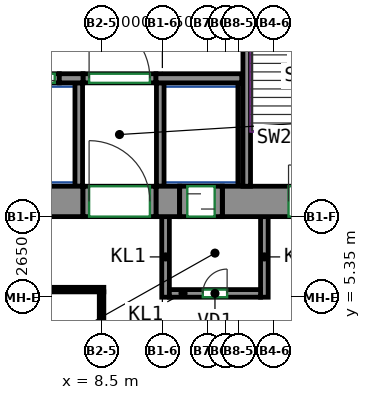
"""IFC4 building model, lengths in metres.
Left out: names, types, materials, properties, quantities, classifications, styles, units other than length and angle.
Written with IfcOpenShell. Run it as: python <this file> out.ifc"""

import sys

from ifc_helpers import new_model, si_unit, direction, frame, frame_2d, origin, place, context, subcontext, project, spatial, rectangle, extrude, source, transform, mapped, element, fill, save


model = new_model("IFC4")
c1 = context("Model", 3, precision=1e-05, world=origin(), true_north=direction((0.0, 1.0)))
c2 = subcontext(c1, "Body", "Model", "MODEL_VIEW")
j1 = project(units=[si_unit("LENGTHUNIT", "METRE"), si_unit("PLANEANGLEUNIT", "RADIAN")], contexts=[c1])
p1 = place(None, origin())
s1 = spatial("IfcSite", under=j1, at=p1, CompositionType="ELEMENT")
p2 = place(p1, origin())
s2 = spatial("IfcBuilding", under=s1, at=p2, CompositionType="ELEMENT")
p3 = place(p2, frame((0.0, 0.0, 22.5)))
s3 = spatial("IfcBuildingStorey", under=s2, at=p3, CompositionType="ELEMENT", Elevation=22.5)
m1 = source(origin(), c2, "Body", "SweptSolid", [
    extrude(rectangle(XDim=14.18, YDim=1.0, at=frame_2d((7.09, 0.0))), origin(), (0.0, 0.0, 1.0), 4.22),
])
p4 = place(p3, frame((-6.29, 8.5, 0.0), z_axis=(0.0, 0.0, 1.0), x_axis=(1.0, 0.0, 0.0)))
e1 = element("IfcWall", 1, at=p4, inside=s3, PredefinedType="SHEAR", context=c2, shape_type="MappedRepresentation", body=[
    mapped(m1, transform((0.0, 0.0, 0.0))),
])
m2 = source(origin(), c2, "Body", "SweptSolid", [
    extrude(rectangle(XDim=0.78, YDim=1.0, at=frame_2d((0.39, 0.0))), origin(), (0.0, 0.0, 1.0), 4.22),
])
p5 = place(p3, frame((10.29, 8.5, 0.0), z_axis=(0.0, 0.0, 1.0), x_axis=(1.0, 0.0, 0.0)))
e2 = element("IfcWall", 2, at=p5, inside=s3, PredefinedType="SHEAR", context=c2, shape_type="MappedRepresentation", body=[
    mapped(m2, transform((0.0, 0.0, 0.0))),
])
m3 = source(origin(), c2, "Body", "SweptSolid", [
    extrude(rectangle(XDim=5.63, YDim=1.0, at=frame_2d((2.815, 0.0))), origin(), (0.0, 0.0, 1.0), 4.22),
])
p6 = place(p3, frame((12.47, 8.5, 0.0), z_axis=(0.0, 0.0, 1.0), x_axis=(1.0, 0.0, 0.0)))
e3 = element("IfcWall", 3, at=p6, inside=s3, PredefinedType="SHEAR", context=c2, shape_type="MappedRepresentation", body=[
    mapped(m3, transform((0.0, 0.0, 0.0))),
])
p7 = place(p6, frame((2.18, 0.0, 0.0)))
e4 = element("IfcOpeningElement", 4, at=p7, cuts=e3, PredefinedType="OPENING", context=c2, shape_type="SweptSolid", body=[
    extrude(rectangle(XDim=1.2, YDim=2.1, at=frame_2d((0.6, 1.05))), frame((0.0, 0.51, 0.0), z_axis=(0.0, -1.0, 0.0), x_axis=(1.0, 0.0, 0.0)), (0.0, 0.0, 1.0), 1.02),
])
m4 = source(origin(), c2, "Body", "SweptSolid", [
    extrude(rectangle(XDim=7.75, YDim=0.25, at=frame_2d((3.875, 0.0))), origin(), (0.0, 0.0, 1.0), 4.22),
])
p8 = place(p3, frame((13.275, 9.0, 0.0), z_axis=(0.0, 0.0, 1.0), x_axis=(0.0, 1.0, 0.0)))
e5 = element("IfcWall", 5, at=p8, inside=s3, PredefinedType="SHEAR", context=c2, shape_type="MappedRepresentation", body=[
    mapped(m4, transform((0.0, 0.0, 0.0))),
])
m5 = source(origin(), c2, "Body", "SweptSolid", [
    extrude(rectangle(XDim=0.78, YDim=0.3, at=frame_2d((0.39, 0.0))), origin(), (0.0, 0.0, 1.0), 4.22),
])
p9 = place(p3, frame((7.11, 12.55, 0.0), z_axis=(0.0, 0.0, 1.0), x_axis=(1.0, 0.0, 0.0)))
e6 = element("IfcWall", 6, at=p9, inside=s3, PredefinedType="SHEAR", context=c2, shape_type="MappedRepresentation", body=[
    mapped(m5, transform((0.0, 0.0, 0.0))),
])
m6 = source(origin(), c2, "Body", "SweptSolid", [
    extrude(rectangle(XDim=2.82, YDim=0.3, at=frame_2d((1.41, 0.0))), origin(), (0.0, 0.0, 1.0), 4.22),
])
p10 = place(p3, frame((10.29, 12.55, 0.0), z_axis=(0.0, 0.0, 1.0), x_axis=(1.0, 0.0, 0.0)))
e7 = element("IfcWall", 7, at=p10, inside=s3, PredefinedType="SHEAR", context=c2, shape_type="MappedRepresentation", body=[
    mapped(m6, transform((0.0, 0.0, 0.0))),
])
m7 = source(origin(), c2, "Body", "SweptSolid", [
    extrude(rectangle(XDim=1.4, YDim=1.0, at=frame_2d((0.7, 0.0))), origin(), (0.0, 0.0, 1.0), 0.27),
])
p11 = place(p3, frame((11.07, 8.5, 3.95), z_axis=(0.0, 0.0, 1.0), x_axis=(1.0, 0.0, 0.0)))
e8 = element("IfcWall", 8, at=p11, inside=s3, PredefinedType="SHEAR", context=c2, shape_type="MappedRepresentation", body=[
    mapped(m7, transform((0.0, 0.0, 0.0))),
])
m8 = source(origin(), c2, "Body", "SweptSolid", [
    extrude(rectangle(XDim=1.4, YDim=0.3, at=frame_2d((0.7, 0.0))), origin(), (0.0, 0.0, 1.0), 4.22),
])
p12 = place(p3, frame((5.71, 12.55, 0.0), z_axis=(0.0, 0.0, 1.0), x_axis=(1.0, 0.0, 0.0)))
e9 = element("IfcWall", 9, at=p12, inside=s3, PredefinedType="PARTITIONING", context=c2, shape_type="MappedRepresentation", body=[
    mapped(m8, transform((0.0, 0.0, 0.0))),
])
p13 = place(p12, frame((0.15, 0.0, 0.0)))
e10 = element("IfcOpeningElement", 10, at=p13, cuts=e9, PredefinedType="OPENING", context=c2, shape_type="SweptSolid", body=[
    extrude(rectangle(XDim=1.1, YDim=2.1, at=frame_2d((0.55, 1.05))), frame((0.0, 0.16, 0.0), z_axis=(0.0, -1.0, 0.0), x_axis=(1.0, 0.0, 0.0)), (0.0, 0.0, 1.0), 0.32),
])
m9 = source(origin(), c2, "Body", "SweptSolid", [
    extrude(rectangle(XDim=2.4, YDim=0.3, at=frame_2d((1.2, 0.0))), origin(), (0.0, 0.0, 1.0), 4.22),
])
p14 = place(p3, frame((7.89, 12.55, 0.0), z_axis=(0.0, 0.0, 1.0), x_axis=(1.0, 0.0, 0.0)))
e11 = element("IfcWall", 11, at=p14, inside=s3, PredefinedType="PARTITIONING", context=c2, shape_type="MappedRepresentation", body=[
    mapped(m9, transform((0.0, 0.0, 0.0))),
])
p15 = place(p14, frame((0.2, 0.0, 0.0)))
e12 = element("IfcOpeningElement", 12, at=p15, cuts=e11, PredefinedType="OPENING", context=c2, shape_type="SweptSolid", body=[
    extrude(rectangle(XDim=2.0, YDim=2.1, at=frame_2d((1.0, 1.05))), frame((0.0, 0.16, 0.0), z_axis=(0.0, -1.0, 0.0), x_axis=(1.0, 0.0, 0.0)), (0.0, 0.0, 1.0), 0.32),
])
m10 = source(origin(), c2, "Body", "SweptSolid", [
    extrude(rectangle(XDim=2.65, YDim=0.25, at=frame_2d((1.325, 0.0))), origin(), (0.0, 0.0, 1.0), 4.22),
])
for number, where, z_axis, x_axis in (
    (13, (10.605, 5.35, 0.0), (0.0, 0.0, 1.0), (0.0, 1.0, 0.0)),
    (14, (13.855, 5.35, 0.0), (0.0, 0.0, 1.0), (0.0, 1.0, 0.0)),
):
    element("IfcWall", number, at=place(p3, frame(where, z_axis=z_axis, x_axis=x_axis)), inside=s3, PredefinedType="PARTITIONING", context=c2, shape_type="MappedRepresentation", body=[
        mapped(m10, transform((0.0, 0.0, 0.0))),
    ])
m11 = source(origin(), c2, "Body", "SweptSolid", [
    extrude(rectangle(XDim=3.0, YDim=0.25, at=frame_2d((1.5, 0.0))), origin(), (0.0, 0.0, 1.0), 4.22),
])
p16 = place(p3, frame((10.73, 5.475, 0.0), z_axis=(0.0, 0.0, 1.0), x_axis=(1.0, 0.0, 0.0)))
e15 = element("IfcWall", 15, at=p16, inside=s3, PredefinedType="PARTITIONING", context=c2, shape_type="MappedRepresentation", body=[
    mapped(m11, transform((0.0, 0.0, 0.0))),
])
p17 = place(p16, frame((1.1, 0.0, 0.0)))
e16 = element("IfcOpeningElement", 16, at=p17, cuts=e15, PredefinedType="OPENING", context=c2, shape_type="SweptSolid", body=[
    extrude(rectangle(XDim=0.8, YDim=2.0, at=frame_2d((0.4, 1.0))), frame((0.0, 0.135, 0.0), z_axis=(0.0, -1.0, 0.0), x_axis=(1.0, 0.0, 0.0)), (0.0, 0.0, 1.0), 0.27),
])
m12 = source(origin(), c2, "Body", "SweptSolid", [
    extrude(rectangle(XDim=3.4, YDim=0.25, at=frame_2d((1.7, 0.0))), origin(), (0.0, 0.0, 1.0), 4.22),
])
p18 = place(p3, frame((10.43, 9.0, 0.0), z_axis=(0.0, 0.0, 1.0), x_axis=(0.0, 1.0, 0.0)))
e17 = element("IfcWall", 17, at=p18, inside=s3, PredefinedType="PARTITIONING", context=c2, shape_type="MappedRepresentation", body=[
    mapped(m12, transform((0.0, 0.0, 0.0))),
])
m13 = source(origin(), c2, "Body", "SweptSolid", [
    extrude(rectangle(XDim=3.4, YDim=0.165, at=frame_2d((1.7, 0.0))), origin(), (0.0, 0.0, 1.0), 4.22),
])
p19 = place(p3, frame((13.067, 9.0, 0.0), z_axis=(0.0, 0.0, 1.0), x_axis=(0.0, 1.0, 0.0)))
e18 = element("IfcWall", 18, at=p19, inside=s3, PredefinedType="PARTITIONING", context=c2, shape_type="MappedRepresentation", body=[
    mapped(m13, transform((0.0, 0.0, 0.0))),
])
p20 = place(p3, frame((7.75, 9.0, 0.0), z_axis=(0.0, 0.0, 1.0), x_axis=(0.0, 1.0, 0.0)))
e19 = element("IfcWall", 19, at=p20, inside=s3, PredefinedType="PARTITIONING", context=c2, shape_type="MappedRepresentation", body=[
    mapped(m12, transform((0.0, 0.0, 0.0))),
])
m14 = source(origin(), c2, "Body", "SweptSolid", [
    extrude(rectangle(XDim=2.4, YDim=1.0, at=frame_2d((1.2, 0.0))), origin(), (0.0, 0.0, 1.0), 2.7),
])
p21 = place(p3, frame((7.89, 8.5, 0.0), z_axis=(0.0, 0.0, 1.0), x_axis=(1.0, 0.0, 0.0)))
e20 = element("IfcWall", 20, at=p21, inside=s3, PredefinedType="PARTITIONING", context=c2, shape_type="MappedRepresentation", body=[
    mapped(m14, transform((0.0, 0.0, 0.0))),
])
p22 = place(p21, frame((0.2, 0.0, 0.0)))
e21 = element("IfcOpeningElement", 21, at=p22, cuts=e20, PredefinedType="OPENING", context=c2, shape_type="SweptSolid", body=[
    extrude(rectangle(XDim=2.0, YDim=2.1, at=frame_2d((1.0, 1.05))), frame((0.0, 0.51, 0.0), z_axis=(0.0, -1.0, 0.0), x_axis=(1.0, 0.0, 0.0)), (0.0, 0.0, 1.0), 1.02),
])
m15 = source(origin(), c2, "Body", "SweptSolid", [
    extrude(rectangle(XDim=1.4, YDim=1.0, at=frame_2d((0.7, 0.0))), origin(), (0.0, 0.0, 1.0), 2.7),
])
p23 = place(p3, frame((11.07, 8.5, 0.0), z_axis=(0.0, 0.0, 1.0), x_axis=(1.0, 0.0, 0.0)))
e22 = element("IfcWall", 22, at=p23, inside=s3, PredefinedType="PARTITIONING", context=c2, shape_type="MappedRepresentation", body=[
    mapped(m15, transform((0.0, 0.0, 0.0))),
])
p24 = place(p23, frame((0.25, 0.0, 0.0)))
e23 = element("IfcOpeningElement", 23, at=p24, cuts=e22, PredefinedType="OPENING", context=c2, shape_type="SweptSolid", body=[
    extrude(rectangle(XDim=0.9, YDim=2.1, at=frame_2d((0.45, 1.05))), frame((0.0, 0.51, 0.0), z_axis=(0.0, -1.0, 0.0), x_axis=(1.0, 0.0, 0.0)), (0.0, 0.0, 1.0), 1.02),
])
p25 = place(p3, frame((8.5, 5.525, 0.0), z_axis=(0.0, 0.0, 1.0), x_axis=(0.0, -1.0, 0.0)))
e24 = element("IfcWall", 24, at=p25, inside=s3, PredefinedType="PARTITIONING", context=c2, shape_type="SweptSolid", body=[
    extrude(rectangle(XDim=14.85, YDim=0.15, at=frame_2d((7.425, 0.0))), origin(), (0.0, 0.0, 1.0), 4.22),
])
p26 = place(p25, frame((9.735, 0.0, 0.0)))
e25 = element("IfcOpeningElement", 25, at=p26, cuts=e24, PredefinedType="OPENING", context=c2, shape_type="SweptSolid", body=[
    extrude(rectangle(XDim=1.0, YDim=2.1, at=frame_2d((0.5, 1.05))), frame((0.0, 0.085, 0.0), z_axis=(0.0, -1.0, 0.0), x_axis=(1.0, 0.0, 0.0)), (0.0, 0.0, 1.0), 0.17),
])
p27 = place(p3, frame((-5.4, 5.6, 0.0), z_axis=(0.0, 0.0, 1.0), x_axis=(1.0, 0.0, 0.0)))
e26 = element("IfcWall", 26, at=p27, inside=s3, PredefinedType="PARTITIONING", context=c2, shape_type="SweptSolid", body=[
    extrude(rectangle(XDim=13.975, YDim=0.15, at=frame_2d((6.987, 0.0))), origin(), (0.0, 0.0, 1.0), 4.22),
])
p28 = place(p15, origin())
e27 = element("IfcDoor", 27, at=p28, inside=s3, OperationType="DOUBLE_DOOR_SINGLE_SWING", PredefinedType="DOOR", context=c2, shape_type="SweptSolid", body=[
    extrude(rectangle(XDim=2.0, YDim=2.1, at=frame_2d((1.0, 1.05))), frame((0.0, 0.025, 0.0), z_axis=(0.0, -1.0, 0.0), x_axis=(1.0, 0.0, 0.0)), (0.0, 0.0, 1.0), 0.05),
])
fill(e12, e27)
p29 = place(p22, origin())
e28 = element("IfcDoor", 28, at=p29, inside=s3, OperationType="DOUBLE_DOOR_SINGLE_SWING", PredefinedType="DOOR", context=c2, shape_type="SweptSolid", body=[
    extrude(rectangle(XDim=2.0, YDim=2.1, at=frame_2d((1.0, 1.05))), frame((0.0, 0.405, 0.0), z_axis=(0.0, -1.0, 0.0), x_axis=(1.0, 0.0, 0.0)), (0.0, 0.0, 1.0), 0.05),
])
fill(e21, e28)
p30 = place(p17, origin())
e29 = element("IfcDoor", 29, at=p30, inside=s3, OperationType="SINGLE_SWING_RIGHT", PredefinedType="DOOR", context=c2, shape_type="SweptSolid", body=[
    extrude(rectangle(XDim=0.8, YDim=2.0, at=frame_2d((0.4, 1.0))), frame((0.0, 0.025, 0.0), z_axis=(0.0, -1.0, 0.0), x_axis=(1.0, 0.0, 0.0)), (0.0, 0.0, 1.0), 0.05),
])
fill(e16, e29)
p31 = place(p24, origin())
e30 = element("IfcDoor", 30, at=p31, inside=s3, OperationType="SLIDING_TO_LEFT", PredefinedType="DOOR", context=c2, shape_type="SweptSolid", body=[
    extrude(rectangle(XDim=0.9, YDim=2.1, at=frame_2d((0.45, 1.05))), frame((0.0, 0.405, 0.0), z_axis=(0.0, -1.0, 0.0), x_axis=(1.0, 0.0, 0.0)), (0.0, 0.0, 1.0), 0.05),
])
fill(e23, e30)
p32 = place(p13, origin())
e31 = element("IfcDoor", 31, at=p32, inside=s3, OperationType="DOUBLE_DOOR_SLIDING", PredefinedType="DOOR", context=c2, shape_type="SweptSolid", body=[
    extrude(rectangle(XDim=1.1, YDim=2.1, at=frame_2d((0.55, 1.05))), frame((0.0, 0.025, 0.0), z_axis=(0.0, -1.0, 0.0), x_axis=(1.0, 0.0, 0.0)), (0.0, 0.0, 1.0), 0.05),
])
fill(e10, e31)
p33 = place(p7, origin())
e32 = element("IfcDoor", 32, at=p33, inside=s3, OperationType="DOUBLE_DOOR_SINGLE_SWING", PredefinedType="DOOR", context=c2, shape_type="SweptSolid", body=[
    extrude(rectangle(XDim=1.2, YDim=2.1, at=frame_2d((0.6, 1.05))), frame((0.0, 0.405, 0.0), z_axis=(0.0, -1.0, 0.0), x_axis=(1.0, 0.0, 0.0)), (0.0, 0.0, 1.0), 0.05),
])
fill(e4, e32)
save(model, sys.argv[1])
